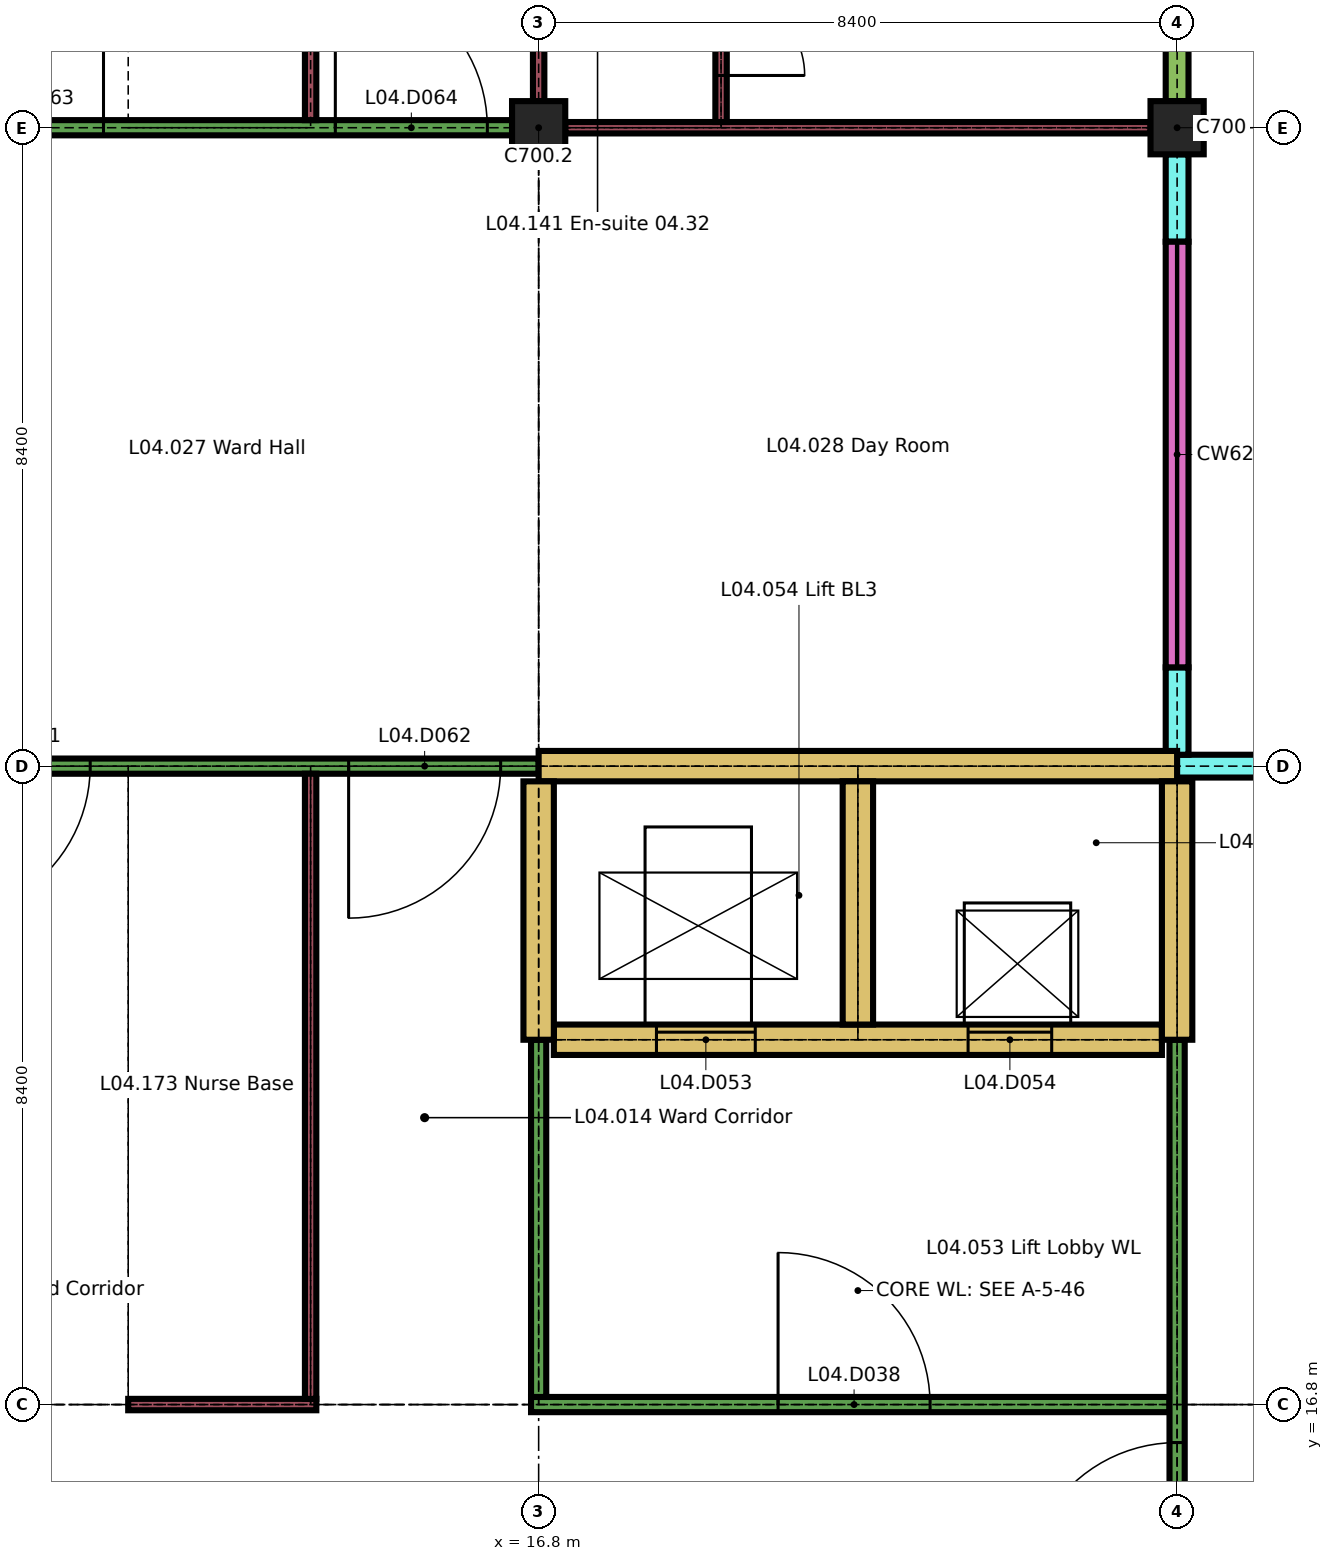
"""IFC4 building model, lengths in metres.
Left out: names, types, materials, properties, quantities, classifications, styles, units other than length and angle.
Written with IfcOpenShell. Run it as: python <this file> out.ifc"""

import sys

from ifc_helpers import new_model, si_unit, direction, frame, frame_2d, origin, origin_2d, place, context, subcontext, project, spatial, rectangle, extrude, element, fill, save


model = new_model("IFC4")
c1 = context("Model", 3, precision=1e-05, world=origin(), true_north=direction((0.0, 1.0)))
c2 = subcontext(c1, "Body", "Model", "MODEL_VIEW")
j1 = project(units=[si_unit("LENGTHUNIT", "METRE"), si_unit("PLANEANGLEUNIT", "RADIAN")], contexts=[c1])
p1 = place(None, origin())
s1 = spatial("IfcSite", under=j1, at=p1, CompositionType="ELEMENT")
p2 = place(p1, origin())
s2 = spatial("IfcBuilding", under=s1, at=p2, CompositionType="ELEMENT")
p3 = place(p2, frame((0.0, 0.0, 18.9)))
s3 = spatial("IfcBuildingStorey", under=s2, at=p3, CompositionType="ELEMENT", Elevation=18.9)
for number, where, z_axis, x_axis in (
    (1, (16.8, 33.6, 0.0), (0.0, 0.0, 1.0), (1.0, 0.0, 0.0)),
    (2, (25.2, 33.6, 0.0), (0.0, 0.0, 1.0), (1.0, 0.0, 0.0)),
):
    element("IfcColumn", number, at=place(p3, frame(where, z_axis=z_axis, x_axis=x_axis)), inside=s3, PredefinedType="COLUMN", context=c2, shape_type="SweptSolid", body=[
        extrude(rectangle(XDim=0.7, YDim=0.7, at=origin_2d()), origin(), (0.0, 0.0, 1.0), 3.26),
    ])
p4 = place(p3, frame((25.05, 25.2, 0.0), z_axis=(0.0, 0.0, 1.0), x_axis=(1.0, 0.0, 0.0)))
e3 = element("IfcWall", 3, at=p4, inside=s3, PredefinedType="SOLIDWALL", context=c2, shape_type="SweptSolid", body=[
    extrude(rectangle(XDim=1.45, YDim=0.3, at=frame_2d((0.725, 0.0))), origin(), (0.0, 0.0, 1.0), 3.26),
])
for number, where, z_axis, x_axis in (
    (4, (25.2, 25.35, 0.0), (0.0, 0.0, 1.0), (0.0, 1.0, 0.0)),
    (5, (25.2, 32.1, 0.0), (0.0, 0.0, 1.0), (0.0, 1.0, 0.0)),
):
    element("IfcWall", number, at=place(p3, frame(where, z_axis=z_axis, x_axis=x_axis)), inside=s3, PredefinedType="SOLIDWALL", context=c2, shape_type="SweptSolid", body=[
        extrude(rectangle(XDim=1.15, YDim=0.3, at=frame_2d((0.575, 0.0))), origin(), (0.0, 0.0, 1.0), 3.26),
    ])
p5 = place(p3, frame((25.2, 26.5, 0.0), z_axis=(0.0, 0.0, 1.0), x_axis=(0.0, 1.0, 0.0)))
e6 = element("IfcWall", 6, at=p5, inside=s3, PredefinedType="SOLIDWALL", context=c2, shape_type="SweptSolid", body=[
    extrude(rectangle(XDim=5.6, YDim=0.3, at=frame_2d((2.8, 0.0))), origin(), (0.0, 0.0, 1.0), 0.6),
])
p6 = place(p3, frame((25.2, 33.95, 0.0), z_axis=(0.0, 0.0, 1.0), x_axis=(0.0, 1.0, 0.0)))
e7 = element("IfcWall", 7, at=p6, inside=s3, PredefinedType="SOLIDWALL", context=c2, shape_type="SweptSolid", body=[
    extrude(rectangle(XDim=3.85, YDim=0.3, at=frame_2d((1.925, 0.0))), origin(), (0.0, 0.0, 1.0), 2.96),
])
p7 = place(p6, frame((0.7, 0.0, 0.9)))
e8 = element("IfcOpeningElement", 8, at=p7, cuts=e7, PredefinedType="OPENING", context=c2, shape_type="SweptSolid", body=[
    extrude(rectangle(XDim=2.1, YDim=1.5, at=frame_2d((1.05, 0.75))), frame((0.0, 0.16, 0.0), z_axis=(0.0, -1.0, 0.0), x_axis=(1.0, 0.0, 0.0)), (0.0, 0.0, 1.0), 0.32),
])
p8 = place(p3, frame((11.4, 16.8, 0.0), z_axis=(0.0, 0.0, 1.0), x_axis=(1.0, 0.0, 0.0)))
e9 = element("IfcWall", 9, at=p8, inside=s3, PredefinedType="PARTITIONING", context=c2, shape_type="SweptSolid", body=[
    extrude(rectangle(XDim=2.475, YDim=0.15, at=frame_2d((1.238, 0.0))), origin(), (0.0, 0.0, 1.0), 3.26),
])
p9 = place(p3, frame((16.7, 16.8, 0.0), z_axis=(0.0, 0.0, 1.0), x_axis=(1.0, 0.0, 0.0)))
e10 = element("IfcWall", 10, at=p9, inside=s3, PredefinedType="PARTITIONING", context=c2, shape_type="SweptSolid", body=[
    extrude(rectangle(XDim=8.4, YDim=0.2, at=frame_2d((4.2, 0.0))), origin(), (0.0, 0.0, 1.0), 3.26),
])
p10 = place(p9, frame((3.25, 0.0, 0.0)))
e11 = element("IfcOpeningElement", 11, at=p10, cuts=e10, PredefinedType="OPENING", context=c2, shape_type="SweptSolid", body=[
    extrude(rectangle(XDim=2.0, YDim=2.4, at=frame_2d((1.0, 1.2))), frame((0.0, 0.11, 0.0), z_axis=(0.0, -1.0, 0.0), x_axis=(1.0, 0.0, 0.0)), (0.0, 0.0, 1.0), 0.22),
])
p11 = place(p3, frame((17.0, 21.6, 0.0), z_axis=(0.0, 0.0, 1.0), x_axis=(1.0, 0.0, 0.0)))
e12 = element("IfcWall", 12, at=p11, inside=s3, PredefinedType="SHEAR", context=c2, shape_type="SweptSolid", body=[
    extrude(rectangle(XDim=8.0, YDim=0.4, at=frame_2d((4.0, 0.0))), origin(), (0.0, 0.0, 1.0), 3.26),
])
p12 = place(p11, frame((1.35, 0.0, 0.0)))
e13 = element("IfcOpeningElement", 13, at=p12, cuts=e12, PredefinedType="OPENING", context=c2, shape_type="SweptSolid", body=[
    extrude(rectangle(XDim=1.3, YDim=2.1, at=frame_2d((0.65, 1.05))), frame((0.0, 0.21, 0.0), z_axis=(0.0, -1.0, 0.0), x_axis=(1.0, 0.0, 0.0)), (0.0, 0.0, 1.0), 0.42),
])
p13 = place(p11, frame((5.45, 0.0, 0.0)))
e14 = element("IfcOpeningElement", 14, at=p13, cuts=e12, PredefinedType="OPENING", context=c2, shape_type="SweptSolid", body=[
    extrude(rectangle(XDim=1.1, YDim=2.1, at=frame_2d((0.55, 1.05))), frame((0.0, 0.21, 0.0), z_axis=(0.0, -1.0, 0.0), x_axis=(1.0, 0.0, 0.0)), (0.0, 0.0, 1.0), 0.42),
])
p14 = place(p3, frame((3.6, 25.2, 0.0), z_axis=(0.0, 0.0, 1.0), x_axis=(1.0, 0.0, 0.0)))
e15 = element("IfcWall", 15, at=p14, inside=s3, PredefinedType="PARTITIONING", context=c2, shape_type="SweptSolid", body=[
    extrude(rectangle(XDim=13.2, YDim=0.2, at=frame_2d((6.6, 0.0))), origin(), (0.0, 0.0, 1.0), 3.26),
])
p15 = place(p14, frame((5.3, 0.0, 0.0)))
e16 = element("IfcOpeningElement", 16, at=p15, cuts=e15, PredefinedType="OPENING", context=c2, shape_type="SweptSolid", body=[
    extrude(rectangle(XDim=2.0, YDim=2.4, at=frame_2d((1.0, 1.2))), frame((0.0, 0.11, 0.0), z_axis=(0.0, -1.0, 0.0), x_axis=(1.0, 0.0, 0.0)), (0.0, 0.0, 1.0), 0.22),
])
p16 = place(p14, frame((10.7, 0.0, 0.0)))
e17 = element("IfcOpeningElement", 17, at=p16, cuts=e15, PredefinedType="OPENING", context=c2, shape_type="SweptSolid", body=[
    extrude(rectangle(XDim=2.0, YDim=2.4, at=frame_2d((1.0, 1.2))), frame((0.0, 0.11, 0.0), z_axis=(0.0, -1.0, 0.0), x_axis=(1.0, 0.0, 0.0)), (0.0, 0.0, 1.0), 0.22),
])
p17 = place(p3, frame((16.8, 25.2, 0.0), z_axis=(0.0, 0.0, 1.0), x_axis=(1.0, 0.0, 0.0)))
e18 = element("IfcWall", 18, at=p17, inside=s3, PredefinedType="SHEAR", context=c2, shape_type="SweptSolid", body=[
    extrude(rectangle(XDim=8.4, YDim=0.4, at=frame_2d((4.2, 0.0))), origin(), (0.0, 0.0, 1.0), 3.26),
])
p18 = place(p3, frame((8.75, 33.6, 0.0), z_axis=(0.0, 0.0, 1.0), x_axis=(1.0, 0.0, 0.0)))
e19 = element("IfcWall", 19, at=p18, inside=s3, PredefinedType="PARTITIONING", context=c2, shape_type="SweptSolid", body=[
    extrude(rectangle(XDim=7.7, YDim=0.2, at=frame_2d((3.85, 0.0))), origin(), (0.0, 0.0, 1.0), 3.26),
])
p19 = place(p18, frame((0.325, 0.0, 0.0)))
e20 = element("IfcOpeningElement", 20, at=p19, cuts=e19, PredefinedType="OPENING", context=c2, shape_type="SweptSolid", body=[
    extrude(rectangle(XDim=2.0, YDim=2.4, at=frame_2d((1.0, 1.2))), frame((0.0, 0.11, 0.0), z_axis=(0.0, -1.0, 0.0), x_axis=(1.0, 0.0, 0.0)), (0.0, 0.0, 1.0), 0.22),
])
p20 = place(p18, frame((5.375, 0.0, 0.0)))
e21 = element("IfcOpeningElement", 21, at=p20, cuts=e19, PredefinedType="OPENING", context=c2, shape_type="SweptSolid", body=[
    extrude(rectangle(XDim=2.0, YDim=2.4, at=frame_2d((1.0, 1.2))), frame((0.0, 0.11, 0.0), z_axis=(0.0, -1.0, 0.0), x_axis=(1.0, 0.0, 0.0)), (0.0, 0.0, 1.0), 0.22),
])
p21 = place(p3, frame((17.15, 33.6, 0.0), z_axis=(0.0, 0.0, 1.0), x_axis=(1.0, 0.0, 0.0)))
e22 = element("IfcWall", 22, at=p21, inside=s3, PredefinedType="PARTITIONING", context=c2, shape_type="SweptSolid", body=[
    extrude(rectangle(XDim=7.7, YDim=0.15, at=frame_2d((3.85, 0.0))), origin(), (0.0, 0.0, 1.0), 3.26),
])
p22 = place(p3, frame((13.8, 16.875, 0.0), z_axis=(0.0, 0.0, 1.0), x_axis=(0.0, 1.0, 0.0)))
e23 = element("IfcWall", 23, at=p22, inside=s3, PredefinedType="PARTITIONING", context=c2, shape_type="SweptSolid", body=[
    extrude(rectangle(XDim=8.225, YDim=0.15, at=frame_2d((4.113, 0.0))), origin(), (0.0, 0.0, 1.0), 3.26),
])
p23 = place(p3, frame((13.8, 33.7, 0.0), z_axis=(0.0, 0.0, 1.0), x_axis=(0.0, 1.0, 0.0)))
e24 = element("IfcWall", 24, at=p23, inside=s3, PredefinedType="PARTITIONING", context=c2, shape_type="SweptSolid", body=[
    extrude(rectangle(XDim=58.6, YDim=0.15, at=frame_2d((29.3, 0.0))), origin(), (0.0, 0.0, 1.0), 3.26),
])
p24 = place(p23, frame((12.6, 0.0, 0.0)))
e25 = element("IfcOpeningElement", 25, at=p24, cuts=e24, PredefinedType="OPENING", context=c2, shape_type="SweptSolid", body=[
    extrude(rectangle(XDim=1.2, YDim=2.1, at=frame_2d((0.6, 1.05))), frame((0.0, 0.085, 0.0), z_axis=(0.0, -1.0, 0.0), x_axis=(1.0, 0.0, 0.0)), (0.0, 0.0, 1.0), 0.17),
])
p25 = place(p23, frame((39.2, 0.0, 0.0)))
e26 = element("IfcOpeningElement", 26, at=p25, cuts=e24, PredefinedType="OPENING", context=c2, shape_type="SweptSolid", body=[
    extrude(rectangle(XDim=1.2, YDim=2.1, at=frame_2d((0.6, 1.05))), frame((0.0, 0.085, 0.0), z_axis=(0.0, -1.0, 0.0), x_axis=(1.0, 0.0, 0.0)), (0.0, 0.0, 1.0), 0.17),
])
p26 = place(p3, frame((16.8, 16.9, 0.0), z_axis=(0.0, 0.0, 1.0), x_axis=(0.0, 1.0, 0.0)))
e27 = element("IfcWall", 27, at=p26, inside=s3, PredefinedType="PARTITIONING", context=c2, shape_type="SweptSolid", body=[
    extrude(rectangle(XDim=4.7, YDim=0.2, at=frame_2d((2.35, 0.0))), origin(), (0.0, 0.0, 1.0), 3.26),
])
p27 = place(p3, frame((16.8, 21.6, 0.0), z_axis=(0.0, 0.0, 1.0), x_axis=(0.0, 1.0, 0.0)))
e28 = element("IfcWall", 28, at=p27, inside=s3, PredefinedType="SHEAR", context=c2, shape_type="SweptSolid", body=[
    extrude(rectangle(XDim=3.4, YDim=0.4, at=frame_2d((1.7, 0.0))), origin(), (0.0, 0.0, 1.0), 3.26),
])
p28 = place(p3, frame((16.8, 33.95, 0.0), z_axis=(0.0, 0.0, 1.0), x_axis=(0.0, 1.0, 0.0)))
e29 = element("IfcWall", 29, at=p28, inside=s3, PredefinedType="PARTITIONING", context=c2, shape_type="SweptSolid", body=[
    extrude(rectangle(XDim=8.05, YDim=0.15, at=frame_2d((4.025, 0.0))), origin(), (0.0, 0.0, 1.0), 3.26),
])
p29 = place(p28, frame((2.35, 0.0, 0.0)))
e30 = element("IfcOpeningElement", 30, at=p29, cuts=e29, PredefinedType="OPENING", context=c2, shape_type="SweptSolid", body=[
    extrude(rectangle(XDim=1.2, YDim=2.1, at=frame_2d((0.6, 1.05))), frame((0.0, 0.085, 0.0), z_axis=(0.0, -1.0, 0.0), x_axis=(1.0, 0.0, 0.0)), (0.0, 0.0, 1.0), 0.17),
])
p30 = place(p28, frame((4.1, 0.0, 0.0)))
e31 = element("IfcOpeningElement", 31, at=p30, cuts=e29, PredefinedType="OPENING", context=c2, shape_type="SweptSolid", body=[
    extrude(rectangle(XDim=1.5, YDim=2.4, at=frame_2d((0.75, 1.2))), frame((0.0, 0.085, 0.0), z_axis=(0.0, -1.0, 0.0), x_axis=(1.0, 0.0, 0.0)), (0.0, 0.0, 1.0), 0.17),
])
p31 = place(p3, frame((19.2, 33.675, 0.0), z_axis=(0.0, 0.0, 1.0), x_axis=(0.0, 1.0, 0.0)))
e32 = element("IfcWall", 32, at=p31, inside=s3, PredefinedType="PARTITIONING", context=c2, shape_type="SweptSolid", body=[
    extrude(rectangle(XDim=4.05, YDim=0.15, at=frame_2d((2.025, 0.0))), origin(), (0.0, 0.0, 1.0), 3.26),
])
p32 = place(p31, frame((0.613, 0.0, 0.0)))
e33 = element("IfcOpeningElement", 33, at=p32, cuts=e32, PredefinedType="OPENING", context=c2, shape_type="SweptSolid", body=[
    extrude(rectangle(XDim=1.1, YDim=2.1, at=frame_2d((0.55, 1.05))), frame((0.0, 0.085, 0.0), z_axis=(0.0, -1.0, 0.0), x_axis=(1.0, 0.0, 0.0)), (0.0, 0.0, 1.0), 0.17),
])
p33 = place(p31, frame((2.587, 0.0, 0.0)))
e34 = element("IfcOpeningElement", 34, at=p33, cuts=e32, PredefinedType="OPENING", context=c2, shape_type="SweptSolid", body=[
    extrude(rectangle(XDim=1.2, YDim=2.1, at=frame_2d((0.6, 1.05))), frame((0.0, 0.085, 0.0), z_axis=(0.0, -1.0, 0.0), x_axis=(1.0, 0.0, 0.0)), (0.0, 0.0, 1.0), 0.17),
])
p34 = place(p3, frame((21.0, 21.8, 0.0), z_axis=(0.0, 0.0, 1.0), x_axis=(0.0, 1.0, 0.0)))
e35 = element("IfcWall", 35, at=p34, inside=s3, PredefinedType="SHEAR", context=c2, shape_type="SweptSolid", body=[
    extrude(rectangle(XDim=3.2, YDim=0.4, at=frame_2d((1.6, 0.0))), origin(), (0.0, 0.0, 1.0), 3.26),
])
p35 = place(p3, frame((25.2, 8.75, 0.0), z_axis=(0.0, 0.0, 1.0), x_axis=(0.0, 1.0, 0.0)))
e36 = element("IfcWall", 36, at=p35, inside=s3, PredefinedType="PARTITIONING", context=c2, shape_type="SweptSolid", body=[
    extrude(rectangle(XDim=12.85, YDim=0.2, at=frame_2d((6.425, 0.0))), origin(), (0.0, 0.0, 1.0), 3.26),
])
p36 = place(p35, frame((0.325, 0.0, 0.0)))
e37 = element("IfcOpeningElement", 37, at=p36, cuts=e36, PredefinedType="OPENING", context=c2, shape_type="SweptSolid", body=[
    extrude(rectangle(XDim=2.0, YDim=2.4, at=frame_2d((1.0, 1.2))), frame((0.0, 0.11, 0.0), z_axis=(0.0, -1.0, 0.0), x_axis=(1.0, 0.0, 0.0)), (0.0, 0.0, 1.0), 0.22),
])
p37 = place(p35, frame((5.55, 0.0, 0.0)))
e38 = element("IfcOpeningElement", 38, at=p37, cuts=e36, PredefinedType="OPENING", context=c2, shape_type="SweptSolid", body=[
    extrude(rectangle(XDim=2.0, YDim=2.4, at=frame_2d((1.0, 1.2))), frame((0.0, 0.11, 0.0), z_axis=(0.0, -1.0, 0.0), x_axis=(1.0, 0.0, 0.0)), (0.0, 0.0, 1.0), 0.22),
])
p38 = place(p3, frame((25.2, 21.6, 0.0), z_axis=(0.0, 0.0, 1.0), x_axis=(0.0, 1.0, 0.0)))
e39 = element("IfcWall", 39, at=p38, inside=s3, PredefinedType="SHEAR", context=c2, shape_type="SweptSolid", body=[
    extrude(rectangle(XDim=3.4, YDim=0.4, at=frame_2d((1.7, 0.0))), origin(), (0.0, 0.0, 1.0), 3.26),
])
p39 = place(p10, origin())
e40 = element("IfcDoor", 40, at=p39, inside=s3, OperationType="SINGLE_SWING_RIGHT", PredefinedType="DOOR", context=c2, shape_type="SweptSolid", body=[
    extrude(rectangle(XDim=2.0, YDim=2.4, at=frame_2d((1.0, 1.2))), frame((0.0, 0.03, 0.0), z_axis=(0.0, -1.0, 0.0), x_axis=(1.0, 0.0, 0.0)), (0.0, 0.0, 1.0), 0.06),
])
fill(e11, e40)
p40 = place(p12, origin())
e41 = element("IfcDoor", 41, at=p40, inside=s3, OperationType="SLIDING_TO_LEFT", PredefinedType="DOOR", context=c2, shape_type="SweptSolid", body=[
    extrude(rectangle(XDim=1.3, YDim=2.1, at=frame_2d((0.65, 1.05))), frame((0.0, 0.025, 0.0), z_axis=(0.0, -1.0, 0.0), x_axis=(1.0, 0.0, 0.0)), (0.0, 0.0, 1.0), 0.05),
])
fill(e13, e41)
p41 = place(p13, origin())
e42 = element("IfcDoor", 42, at=p41, inside=s3, OperationType="SLIDING_TO_LEFT", PredefinedType="DOOR", context=c2, shape_type="SweptSolid", body=[
    extrude(rectangle(XDim=1.1, YDim=2.1, at=frame_2d((0.55, 1.05))), frame((0.0, 0.025, 0.0), z_axis=(0.0, -1.0, 0.0), x_axis=(1.0, 0.0, 0.0)), (0.0, 0.0, 1.0), 0.05),
])
fill(e14, e42)
p42 = place(p15, origin())
e43 = element("IfcDoor", 43, at=p42, inside=s3, OperationType="SINGLE_SWING_LEFT", PredefinedType="DOOR", context=c2, shape_type="SweptSolid", body=[
    extrude(rectangle(XDim=2.0, YDim=2.4, at=frame_2d((1.0, 1.2))), frame((0.0, 0.03, 0.0), z_axis=(0.0, -1.0, 0.0), x_axis=(1.0, 0.0, 0.0)), (0.0, 0.0, 1.0), 0.06),
])
fill(e16, e43)
p43 = place(p16, origin())
e44 = element("IfcDoor", 44, at=p43, inside=s3, OperationType="SINGLE_SWING_LEFT", PredefinedType="DOOR", context=c2, shape_type="SweptSolid", body=[
    extrude(rectangle(XDim=2.0, YDim=2.4, at=frame_2d((1.0, 1.2))), frame((0.0, 0.03, 0.0), z_axis=(0.0, -1.0, 0.0), x_axis=(1.0, 0.0, 0.0)), (0.0, 0.0, 1.0), 0.06),
])
fill(e17, e44)
p44 = place(p19, origin())
e45 = element("IfcDoor", 45, at=p44, inside=s3, OperationType="SINGLE_SWING_LEFT", PredefinedType="DOOR", context=c2, shape_type="SweptSolid", body=[
    extrude(rectangle(XDim=2.0, YDim=2.4, at=frame_2d((1.0, 1.2))), frame((0.0, 0.03, 0.0), z_axis=(0.0, -1.0, 0.0), x_axis=(1.0, 0.0, 0.0)), (0.0, 0.0, 1.0), 0.06),
])
fill(e20, e45)
p45 = place(p20, origin())
e46 = element("IfcDoor", 46, at=p45, inside=s3, OperationType="SINGLE_SWING_RIGHT", PredefinedType="DOOR", context=c2, shape_type="SweptSolid", body=[
    extrude(rectangle(XDim=2.0, YDim=2.4, at=frame_2d((1.0, 1.2))), frame((0.0, 0.03, 0.0), z_axis=(0.0, -1.0, 0.0), x_axis=(1.0, 0.0, 0.0)), (0.0, 0.0, 1.0), 0.06),
])
fill(e21, e46)
p46 = place(p32, origin())
e47 = element("IfcDoor", 47, at=p46, inside=s3, OperationType="SINGLE_SWING_LEFT", PredefinedType="DOOR", context=c2, shape_type="SweptSolid", body=[
    extrude(rectangle(XDim=1.1, YDim=2.1, at=frame_2d((0.55, 1.05))), frame((0.0, 0.025, 0.0), z_axis=(0.0, -1.0, 0.0), x_axis=(1.0, 0.0, 0.0)), (0.0, 0.0, 1.0), 0.05),
])
fill(e33, e47)
p47 = place(p37, origin())
e48 = element("IfcDoor", 48, at=p47, inside=s3, OperationType="SINGLE_SWING_RIGHT", PredefinedType="DOOR", context=c2, shape_type="SweptSolid", body=[
    extrude(rectangle(XDim=2.0, YDim=2.4, at=frame_2d((1.0, 1.2))), frame((0.0, 0.03, 0.0), z_axis=(0.0, -1.0, 0.0), x_axis=(1.0, 0.0, 0.0)), (0.0, 0.0, 1.0), 0.06),
])
fill(e38, e48)
save(model, sys.argv[1])
